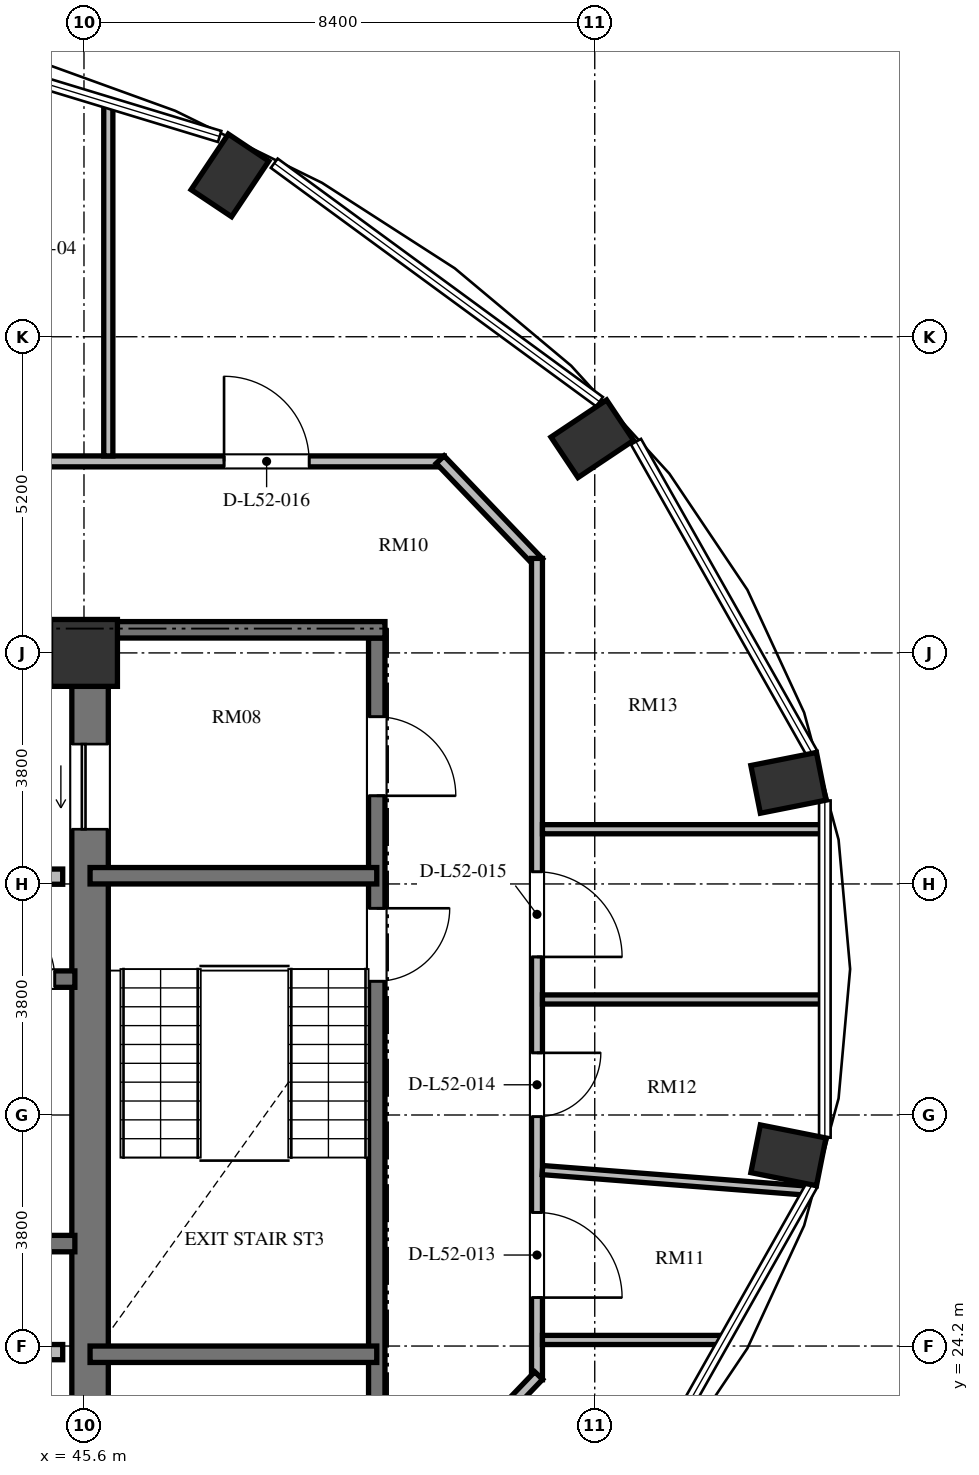
"""IFC4 building model, lengths in metres.
Left out: names, types, materials, properties, quantities, classifications, styles, units other than length and angle.
Written with IfcOpenShell. Run it as: python <this file> out.ifc"""

import sys

from ifc_helpers import new_model, si_unit, direction, frame, frame_2d, origin, origin_2d, place, context, subcontext, project, spatial, rectangle, extrude, element, fill, save


model = new_model("IFC4")
c1 = context("Model", 3, precision=1e-05, world=origin(), true_north=direction((0.0, 1.0)))
c2 = subcontext(c1, "Body", "Model", "MODEL_VIEW")
j1 = project(units=[si_unit("LENGTHUNIT", "METRE"), si_unit("PLANEANGLEUNIT", "RADIAN")], contexts=[c1])
p1 = place(None, origin())
s1 = spatial("IfcSite", under=j1, at=p1, CompositionType="ELEMENT")
p2 = place(p1, origin())
s2 = spatial("IfcBuilding", under=s1, at=p2, CompositionType="ELEMENT")
p3 = place(p2, frame((0.0, 0.0, 202.128)))
s3 = spatial("IfcBuildingStorey", under=s2, at=p3, CompositionType="ELEMENT", Elevation=202.128)
for number, where, z_axis, x_axis in (
    (1, (57.185, 27.337, 0.0), (0.0, 0.0, 1.0), (0.981, -0.195, 0.0)),
    (2, (57.185, 33.463, 0.0), (0.0, 0.0, 1.0), (0.981, 0.195, 0.0)),
    (3, (53.96, 39.123, 0.0), (0.0, 0.0, 1.0), (0.831, 0.556, 0.0)),
    (4, (48.0, 43.454, 0.0), (0.0, 0.0, 1.0), (0.556, 0.831, 0.0)),
):
    element("IfcColumn", number, at=place(p3, frame(where, z_axis=z_axis, x_axis=x_axis)), inside=s3, PredefinedType="COLUMN", context=c2, shape_type="SweptSolid", body=[
        extrude(rectangle(XDim=1.1, YDim=0.8, at=origin_2d()), origin(), (0.0, 0.0, 1.0), 3.648),
    ])
p4 = place(p3, frame((45.6, 35.6, 0.0), z_axis=(0.0, 0.0, 1.0), x_axis=(1.0, 0.0, 0.0)))
e5 = element("IfcColumn", 5, at=p4, inside=s3, PredefinedType="COLUMN", context=c2, shape_type="SweptSolid", body=[
    extrude(rectangle(XDim=1.1, YDim=1.1, at=origin_2d()), origin(), (0.0, 0.0, 1.0), 3.648),
])
p5 = place(p3, frame((45.7, 20.95, 0.0), z_axis=(0.0, 0.0, 1.0), x_axis=(0.0, 1.0, 0.0)))
e6 = element("IfcWall", 6, at=p5, inside=s3, PredefinedType="SHEAR", context=c2, shape_type="SweptSolid", body=[
    extrude(rectangle(XDim=14.1, YDim=0.6, at=frame_2d((7.05, 0.0))), origin(), (0.0, 0.0, 1.0), 3.648),
])
p6 = place(p5, frame((11.75, 0.0, 0.0)))
e7 = element("IfcOpeningElement", 7, at=p6, cuts=e6, PredefinedType="OPENING", context=c2, shape_type="SweptSolid", body=[
    extrude(rectangle(XDim=1.4, YDim=2.3, at=frame_2d((0.7, 1.15))), frame((0.0, 0.31, 0.0), z_axis=(0.0, -1.0, 0.0), x_axis=(1.0, 0.0, 0.0)), (0.0, 0.0, 1.0), 0.62),
])
p7 = place(p5, frame((0.95, 0.0, 0.0)))
e8 = element("IfcOpeningElement", 8, at=p7, cuts=e6, PredefinedType="OPENING", context=c2, shape_type="SweptSolid", body=[
    extrude(rectangle(XDim=1.4, YDim=2.3, at=frame_2d((0.7, 1.15))), frame((0.0, 0.31, 0.0), z_axis=(0.0, -1.0, 0.0), x_axis=(1.0, 0.0, 0.0)), (0.0, 0.0, 1.0), 0.62),
])
p8 = place(p3, frame((37.465, 30.235, 0.0), z_axis=(0.0, 0.0, 1.0), x_axis=(1.0, 0.0, 0.0)))
e9 = element("IfcWall", 9, at=p8, inside=s3, PredefinedType="SHEAR", context=c2, shape_type="SweptSolid", body=[
    extrude(rectangle(XDim=7.985, YDim=0.27, at=frame_2d((3.992, 0.0))), origin(), (0.0, 0.0, 1.0), 3.648),
])
p9 = place(p8, frame((6.455, 0.0, 0.0)))
e10 = element("IfcOpeningElement", 10, at=p9, cuts=e9, PredefinedType="OPENING", context=c2, shape_type="SweptSolid", body=[
    extrude(rectangle(XDim=1.2, YDim=2.15, at=frame_2d((0.6, 1.075))), frame((0.0, 0.145, 0.0), z_axis=(0.0, -1.0, 0.0), x_axis=(1.0, 0.0, 0.0)), (0.0, 0.0, 1.0), 0.29),
])
p10 = place(p3, frame((37.465, 25.885, 0.0), z_axis=(0.0, 0.0, 1.0), x_axis=(1.0, 0.0, 0.0)))
e11 = element("IfcWall", 11, at=p10, inside=s3, PredefinedType="SHEAR", context=c2, shape_type="SweptSolid", body=[
    extrude(rectangle(XDim=7.985, YDim=0.27, at=frame_2d((3.992, 0.0))), origin(), (0.0, 0.0, 1.0), 3.648),
])
for number, where, z_axis, x_axis in (
    (12, (42.95, 31.92, 0.0), (0.0, 0.0, 1.0), (1.0, 0.0, 0.0)),
    (13, (42.95, 24.1, 0.0), (0.0, 0.0, 1.0), (1.0, 0.0, 0.0)),
):
    element("IfcWall", number, at=place(p3, frame(where, z_axis=z_axis, x_axis=x_axis)), inside=s3, PredefinedType="SOLIDWALL", context=c2, shape_type="SweptSolid", body=[
        extrude(rectangle(XDim=2.3, YDim=0.25, at=frame_2d((1.15, 0.0))), origin(), (0.0, 0.0, 1.0), 3.448),
    ])
p11 = place(p3, frame((50.415, 35.845, 0.0), z_axis=(0.0, 0.0, 1.0), x_axis=(0.0, -1.0, 0.0)))
e14 = element("IfcWall", 14, at=p11, inside=s3, PredefinedType="SHEAR", context=c2, shape_type="SweptSolid", body=[
    extrude(rectangle(XDim=15.825, YDim=0.27, at=frame_2d((7.913, 0.0))), origin(), (0.0, 0.0, 1.0), 3.648),
])
p12 = place(p11, frame((4.445, 0.0, 0.0)))
e15 = element("IfcOpeningElement", 15, at=p12, cuts=e14, PredefinedType="OPENING", context=c2, shape_type="SweptSolid", body=[
    extrude(rectangle(XDim=1.2, YDim=2.15, at=frame_2d((0.6, 1.075))), frame((0.0, 0.145, 0.0), z_axis=(0.0, -1.0, 0.0), x_axis=(1.0, 0.0, 0.0)), (0.0, 0.0, 1.0), 0.29),
])
p13 = place(p11, frame((1.295, 0.0, 0.0)))
e16 = element("IfcOpeningElement", 16, at=p13, cuts=e14, PredefinedType="OPENING", context=c2, shape_type="SweptSolid", body=[
    extrude(rectangle(XDim=1.3, YDim=2.2, at=frame_2d((0.65, 1.1))), frame((0.0, 0.145, 0.0), z_axis=(0.0, -1.0, 0.0), x_axis=(1.0, 0.0, 0.0)), (0.0, 0.0, 1.0), 0.29),
])
p14 = place(p11, frame((13.095, 0.0, 0.0)))
e17 = element("IfcOpeningElement", 17, at=p14, cuts=e14, PredefinedType="OPENING", context=c2, shape_type="SweptSolid", body=[
    extrude(rectangle(XDim=1.3, YDim=2.2, at=frame_2d((0.65, 1.1))), frame((0.0, 0.145, 0.0), z_axis=(0.0, -1.0, 0.0), x_axis=(1.0, 0.0, 0.0)), (0.0, 0.0, 1.0), 0.29),
])
p15 = place(p3, frame((46.0, 35.98, 0.0), z_axis=(0.0, 0.0, 1.0), x_axis=(1.0, 0.0, 0.0)))
e18 = element("IfcWall", 18, at=p15, inside=s3, PredefinedType="SHEAR", context=c2, shape_type="SweptSolid", body=[
    extrude(rectangle(XDim=4.55, YDim=0.27, at=frame_2d((2.275, 0.0))), origin(), (0.0, 0.0, 1.0), 3.648),
])
for number, where, z_axis, x_axis in (
    (19, (45.7, 31.935, 0.0), (0.0, 0.0, 1.0), (1.0, 0.0, 0.0)),
    (20, (45.7, 24.065, 0.0), (0.0, 0.0, 1.0), (1.0, 0.0, 0.0)),
):
    element("IfcWall", number, at=place(p3, frame(where, z_axis=z_axis, x_axis=x_axis)), inside=s3, PredefinedType="SHEAR", context=c2, shape_type="SweptSolid", body=[
        extrude(rectangle(XDim=4.715, YDim=0.27, at=frame_2d((2.357, 0.0))), origin(), (0.0, 0.0, 1.0), 3.648),
    ])
p16 = place(p3, frame((30.71, 38.75, 0.0), z_axis=(0.0, 0.0, 1.0), x_axis=(1.0, 0.0, 0.0)))
e21 = element("IfcWall", 21, at=p16, inside=s3, PredefinedType="PARTITIONING", context=c2, shape_type="SweptSolid", body=[
    extrude(rectangle(XDim=20.815, YDim=0.18, at=frame_2d((10.408, 0.0))), origin(), (0.0, 0.0, 1.0), 3.073),
])
p17 = place(p16, frame((17.194, 0.0, 0.0)))
e22 = element("IfcOpeningElement", 22, at=p17, cuts=e21, PredefinedType="OPENING", context=c2, shape_type="SweptSolid", body=[
    extrude(rectangle(XDim=1.4, YDim=2.2, at=frame_2d((0.7, 1.1))), frame((0.0, 0.1, 0.0), z_axis=(0.0, -1.0, 0.0), x_axis=(1.0, 0.0, 0.0)), (0.0, 0.0, 1.0), 0.2),
])
p18 = place(p16, frame((12.59, 0.0, 0.0)))
e23 = element("IfcOpeningElement", 23, at=p18, cuts=e21, PredefinedType="OPENING", context=c2, shape_type="SweptSolid", body=[
    extrude(rectangle(XDim=1.4, YDim=2.2, at=frame_2d((0.7, 1.1))), frame((0.0, 0.1, 0.0), z_axis=(0.0, -1.0, 0.0), x_axis=(1.0, 0.0, 0.0)), (0.0, 0.0, 1.0), 0.2),
])
p19 = place(p16, frame((8.59, 0.0, 0.0)))
e24 = element("IfcOpeningElement", 24, at=p19, cuts=e21, PredefinedType="OPENING", context=c2, shape_type="SweptSolid", body=[
    extrude(rectangle(XDim=1.4, YDim=2.2, at=frame_2d((0.7, 1.1))), frame((0.0, 0.1, 0.0), z_axis=(0.0, -1.0, 0.0), x_axis=(1.0, 0.0, 0.0)), (0.0, 0.0, 1.0), 0.2),
])
p20 = place(p16, frame((4.59, 0.0, 0.0)))
e25 = element("IfcOpeningElement", 25, at=p20, cuts=e21, PredefinedType="OPENING", context=c2, shape_type="SweptSolid", body=[
    extrude(rectangle(XDim=1.4, YDim=2.2, at=frame_2d((0.7, 1.1))), frame((0.0, 0.1, 0.0), z_axis=(0.0, -1.0, 0.0), x_axis=(1.0, 0.0, 0.0)), (0.0, 0.0, 1.0), 0.2),
])
p21 = place(p16, frame((1.104, 0.0, 0.0)))
e26 = element("IfcOpeningElement", 26, at=p21, cuts=e21, PredefinedType="OPENING", context=c2, shape_type="SweptSolid", body=[
    extrude(rectangle(XDim=1.4, YDim=2.2, at=frame_2d((0.7, 1.1))), frame((0.0, 0.1, 0.0), z_axis=(0.0, -1.0, 0.0), x_axis=(1.0, 0.0, 0.0)), (0.0, 0.0, 1.0), 0.2),
])
p22 = place(p3, frame((51.458, 38.779, 0.0), z_axis=(0.0, 0.0, 1.0), x_axis=(0.691359830363, -0.722510612352, 0.0)))
e27 = element("IfcWall", 27, at=p22, inside=s3, PredefinedType="PARTITIONING", context=c2, shape_type="SweptSolid", body=[
    extrude(rectangle(XDim=2.343, YDim=0.18, at=frame_2d((1.172, 0.0))), origin(), (0.0, 0.0, 1.0), 3.033),
])
p23 = place(p3, frame((53.05, 37.155, 0.0), z_axis=(0.0, 0.0, 1.0), x_axis=(0.0, -1.0, 0.0)))
e28 = element("IfcWall", 28, at=p23, inside=s3, PredefinedType="PARTITIONING", context=c2, shape_type="SweptSolid", body=[
    extrude(rectangle(XDim=13.509, YDim=0.18, at=frame_2d((6.754, 0.0))), origin(), (0.0, 0.0, 1.0), 3.448),
])
p24 = place(p23, frame((10.758, 0.0, 0.0)))
e29 = element("IfcOpeningElement", 29, at=p24, cuts=e28, PredefinedType="OPENING", context=c2, shape_type="SweptSolid", body=[
    extrude(rectangle(XDim=1.4, YDim=2.2, at=frame_2d((0.7, 1.1))), frame((0.0, 0.1, 0.0), z_axis=(0.0, -1.0, 0.0), x_axis=(1.0, 0.0, 0.0)), (0.0, 0.0, 1.0), 0.2),
])
p25 = place(p23, frame((8.133, 0.0, 0.0)))
e30 = element("IfcOpeningElement", 30, at=p25, cuts=e28, PredefinedType="OPENING", context=c2, shape_type="SweptSolid", body=[
    extrude(rectangle(XDim=1.05, YDim=2.15, at=frame_2d((0.525, 1.075))), frame((0.0, 0.1, 0.0), z_axis=(0.0, -1.0, 0.0), x_axis=(1.0, 0.0, 0.0)), (0.0, 0.0, 1.0), 0.2),
])
p26 = place(p23, frame((5.155, 0.0, 0.0)))
e31 = element("IfcOpeningElement", 31, at=p26, cuts=e28, PredefinedType="OPENING", context=c2, shape_type="SweptSolid", body=[
    extrude(rectangle(XDim=1.4, YDim=2.2, at=frame_2d((0.7, 1.1))), frame((0.0, 0.1, 0.0), z_axis=(0.0, -1.0, 0.0), x_axis=(1.0, 0.0, 0.0)), (0.0, 0.0, 1.0), 0.2),
])
p27 = place(p3, frame((53.078, 23.714, 0.0), z_axis=(0.0, 0.0, 1.0), x_axis=(-0.691353379446, -0.722516785085, 0.0)))
e32 = element("IfcWall", 32, at=p27, inside=s3, PredefinedType="PARTITIONING", context=c2, shape_type="SweptSolid", body=[
    extrude(rectangle(XDim=3.604, YDim=0.18, at=frame_2d((1.802, 0.0))), origin(), (0.0, 0.0, 1.0), 3.448),
])
p28 = place(p3, frame((53.14, 24.3, 0.0), z_axis=(0.0, 0.0, 1.0), x_axis=(1.0, 0.0, 0.0)))
e33 = element("IfcWall", 33, at=p28, inside=s3, PredefinedType="PARTITIONING", context=c2, shape_type="SweptSolid", body=[
    extrude(rectangle(XDim=2.982, YDim=0.15, at=frame_2d((1.491, 0.0))), origin(), (0.0, 0.0, 1.0), 3.448),
])
p29 = place(p3, frame((53.14, 27.094, 0.0), z_axis=(0.0, 0.0, 1.0), x_axis=(0.996990775312, -0.077520280847, 0.0)))
e34 = element("IfcWall", 34, at=p29, inside=s3, PredefinedType="PARTITIONING", context=c2, shape_type="SweptSolid", body=[
    extrude(rectangle(XDim=4.396, YDim=0.15, at=frame_2d((2.198, 0.0))), origin(), (0.0, 0.0, 1.0), 3.448),
])
for number, where, z_axis, x_axis in (
    (35, (53.14, 29.9, 0.0), (0.0, 0.0, 1.0), (1.0, 0.0, 0.0)),
    (36, (53.14, 32.7, 0.0), (0.0, 0.0, 1.0), (1.0, 0.0, 0.0)),
):
    element("IfcWall", number, at=place(p3, frame(where, z_axis=z_axis, x_axis=x_axis)), inside=s3, PredefinedType="PARTITIONING", context=c2, shape_type="SweptSolid", body=[
        extrude(rectangle(XDim=4.632, YDim=0.15, at=frame_2d((2.316, 0.0))), origin(), (0.0, 0.0, 1.0), 3.448),
    ])
p30 = place(p3, frame((46.0, 38.84, 0.0), z_axis=(0.0, 0.0, 1.0), x_axis=(0.0, 1.0, 0.0)))
e37 = element("IfcWall", 37, at=p30, inside=s3, PredefinedType="PARTITIONING", context=c2, shape_type="SweptSolid", body=[
    extrude(rectangle(XDim=5.793, YDim=0.15, at=frame_2d((2.896, 0.0))), origin(), (0.0, 0.0, 1.0), 3.448),
])
p31 = place(p9, origin())
e38 = element("IfcDoor", 38, at=p31, inside=s3, OperationType="SINGLE_SWING_LEFT", PredefinedType="DOOR", context=c2, shape_type="SweptSolid", body=[
    extrude(rectangle(XDim=1.2, YDim=2.15, at=frame_2d((0.6, 1.075))), frame((0.0, 0.025, 0.0), z_axis=(0.0, -1.0, 0.0), x_axis=(1.0, 0.0, 0.0)), (0.0, 0.0, 1.0), 0.05),
])
fill(e10, e38)
p32 = place(p6, origin())
e39 = element("IfcDoor", 39, at=p32, inside=s3, OperationType="SLIDING_TO_LEFT", PredefinedType="DOOR", context=c2, shape_type="SweptSolid", body=[
    extrude(rectangle(XDim=1.4, YDim=2.3, at=frame_2d((0.7, 1.15))), frame((0.0, 0.025, 0.0), z_axis=(0.0, -1.0, 0.0), x_axis=(1.0, 0.0, 0.0)), (0.0, 0.0, 1.0), 0.05),
])
fill(e7, e39)
p33 = place(p12, origin())
e40 = element("IfcDoor", 40, at=p33, inside=s3, OperationType="SINGLE_SWING_LEFT", PredefinedType="DOOR", context=c2, shape_type="SweptSolid", body=[
    extrude(rectangle(XDim=1.2, YDim=2.15, at=frame_2d((0.6, 1.075))), frame((0.0, 0.025, 0.0), z_axis=(0.0, -1.0, 0.0), x_axis=(1.0, 0.0, 0.0)), (0.0, 0.0, 1.0), 0.05),
])
fill(e15, e40)
p34 = place(p13, origin())
e41 = element("IfcDoor", 41, at=p34, inside=s3, OperationType="SINGLE_SWING_RIGHT", PredefinedType="DOOR", context=c2, shape_type="SweptSolid", body=[
    extrude(rectangle(XDim=1.3, YDim=2.2, at=frame_2d((0.65, 1.1))), frame((0.0, 0.025, 0.0), z_axis=(0.0, -1.0, 0.0), x_axis=(1.0, 0.0, 0.0)), (0.0, 0.0, 1.0), 0.05),
])
fill(e16, e41)
p35 = place(p24, origin())
e42 = element("IfcDoor", 42, at=p35, inside=s3, OperationType="SINGLE_SWING_RIGHT", PredefinedType="DOOR", context=c2, shape_type="SweptSolid", body=[
    extrude(rectangle(XDim=1.4, YDim=2.2, at=frame_2d((0.7, 1.1))), frame((0.0, 0.025, 0.0), z_axis=(0.0, -1.0, 0.0), x_axis=(1.0, 0.0, 0.0)), (0.0, 0.0, 1.0), 0.05),
])
fill(e29, e42)
p36 = place(p25, origin())
e43 = element("IfcDoor", 43, at=p36, inside=s3, OperationType="SINGLE_SWING_LEFT", PredefinedType="DOOR", context=c2, shape_type="SweptSolid", body=[
    extrude(rectangle(XDim=1.05, YDim=2.15, at=frame_2d((0.525, 1.075))), frame((0.0, 0.025, 0.0), z_axis=(0.0, -1.0, 0.0), x_axis=(1.0, 0.0, 0.0)), (0.0, 0.0, 1.0), 0.05),
])
fill(e30, e43)
p37 = place(p26, origin())
e44 = element("IfcDoor", 44, at=p37, inside=s3, OperationType="SINGLE_SWING_RIGHT", PredefinedType="DOOR", context=c2, shape_type="SweptSolid", body=[
    extrude(rectangle(XDim=1.4, YDim=2.2, at=frame_2d((0.7, 1.1))), frame((0.0, 0.025, 0.0), z_axis=(0.0, -1.0, 0.0), x_axis=(1.0, 0.0, 0.0)), (0.0, 0.0, 1.0), 0.05),
])
fill(e31, e44)
p38 = place(p17, origin())
e45 = element("IfcDoor", 45, at=p38, inside=s3, OperationType="SINGLE_SWING_LEFT", PredefinedType="DOOR", context=c2, shape_type="SweptSolid", body=[
    extrude(rectangle(XDim=1.4, YDim=2.2, at=frame_2d((0.7, 1.1))), frame((0.0, 0.025, 0.0), z_axis=(0.0, -1.0, 0.0), x_axis=(1.0, 0.0, 0.0)), (0.0, 0.0, 1.0), 0.05),
])
fill(e22, e45)
save(model, sys.argv[1])
